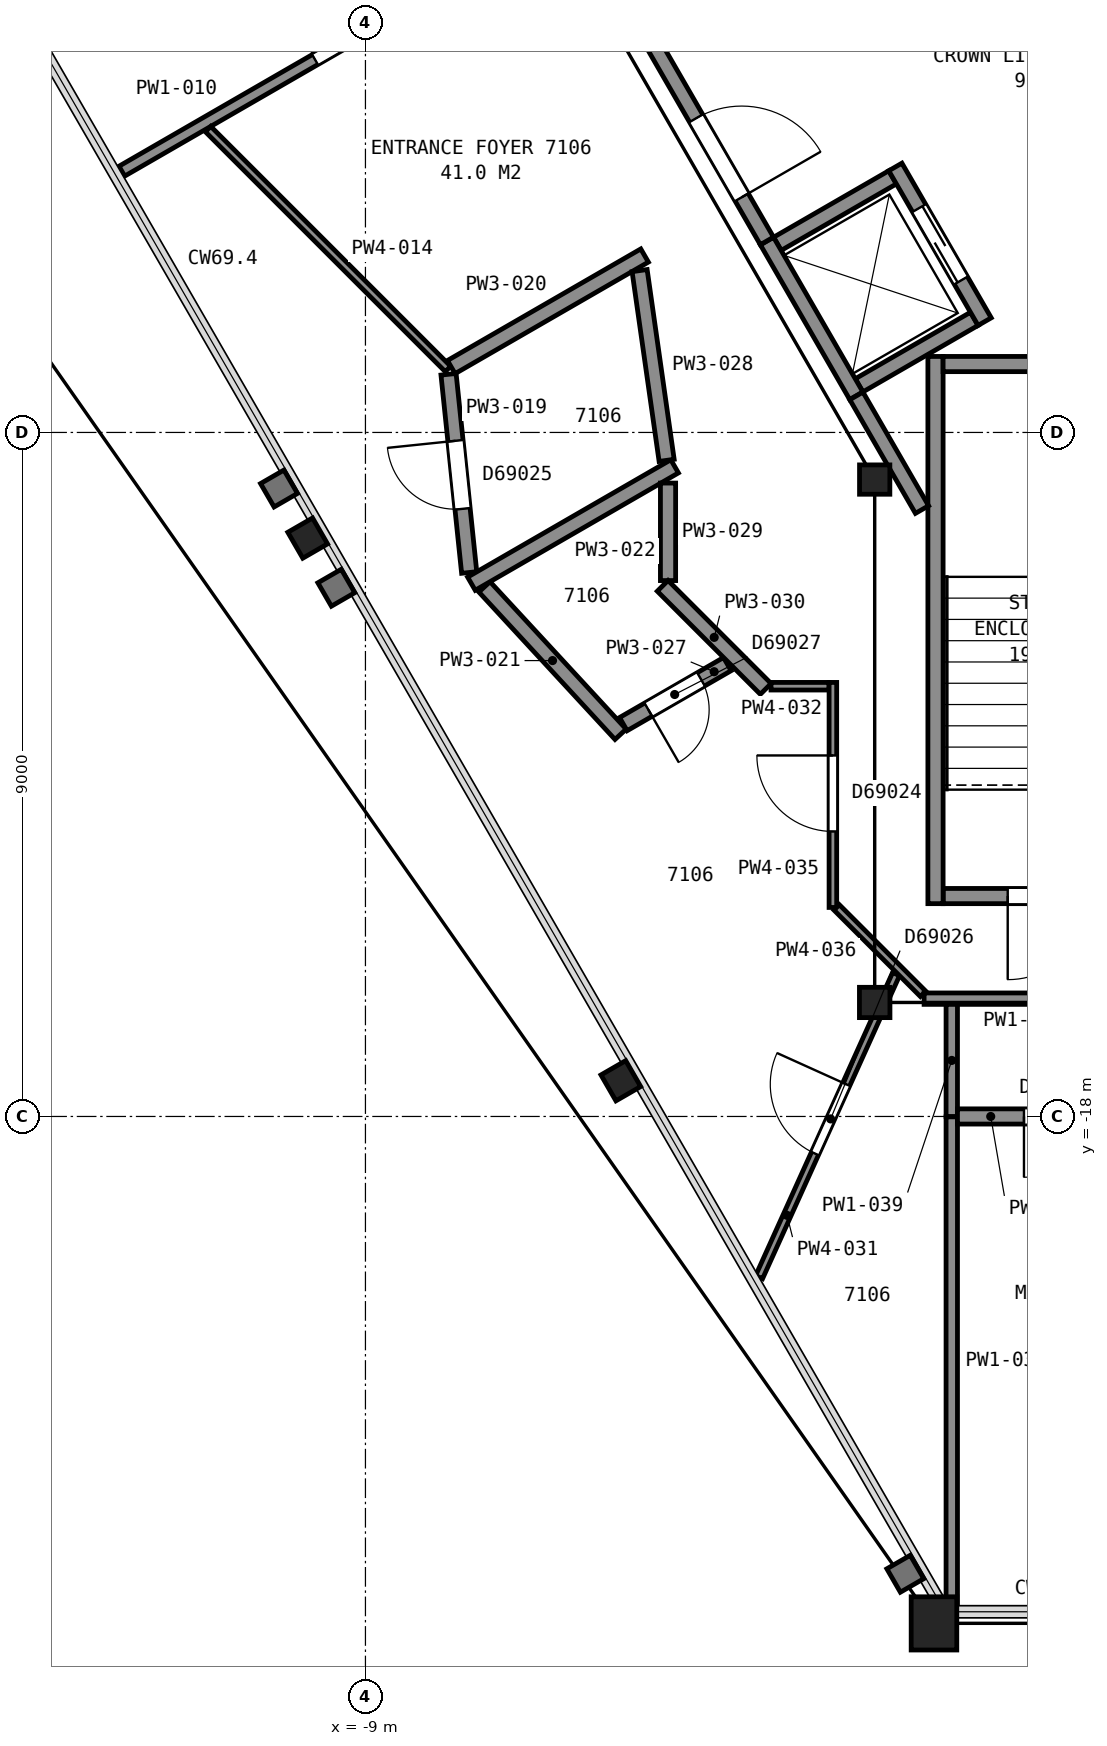
"""IFC4 building model, lengths in metres.
Left out: names, types, materials, properties, quantities, classifications, styles, units other than length and angle.
Written with IfcOpenShell. Run it as: python <this file> out.ifc"""

import sys

from ifc_helpers import new_model, si_unit, direction, frame, frame_2d, origin, origin_2d, place, context, subcontext, project, spatial, rectangle, hollow_rectangle, i_section, extrude, element, fill, save


model = new_model("IFC4")
c1 = context("Model", 3, precision=1e-05, world=origin(), true_north=direction((0.0, 1.0)))
c2 = subcontext(c1, "Body", "Model", "MODEL_VIEW")
j1 = project(units=[si_unit("LENGTHUNIT", "METRE"), si_unit("PLANEANGLEUNIT", "RADIAN")], contexts=[c1])
p1 = place(None, origin())
s1 = spatial("IfcSite", under=j1, at=p1, CompositionType="ELEMENT")
p2 = place(p1, origin())
s2 = spatial("IfcBuilding", under=s1, at=p2, CompositionType="ELEMENT")
p3 = place(p2, frame((0.0, 0.0, 282.5)))
s3 = spatial("IfcBuildingStorey", under=s2, at=p3, CompositionType="ELEMENT", Elevation=282.5)
for number, where, z_axis, x_axis in (
    (1, (-9.76, -10.39, 0.0), (0.0, 0.0, 1.0), (-0.5, 0.866, 0.0)),
    (2, (-5.64, -17.53, 0.0), (0.0, 0.0, 1.0), (-0.5, 0.866, 0.0)),
):
    element("IfcColumn", number, at=place(p3, frame(where, z_axis=z_axis, x_axis=x_axis)), inside=s3, PredefinedType="COLUMN", context=c2, shape_type="SweptSolid", body=[
        extrude(i_section(OverallWidth=0.394, OverallDepth=0.376, WebThickness=0.017, FlangeThickness=0.028, FilletRadius=0.015, at=origin_2d()), origin(), (0.0, 0.0, 1.0), 3.7),
    ])
p4 = place(p3, frame((-1.52, -24.67, 0.0), z_axis=(0.0, 0.0, 1.0), x_axis=(-1.0, 0.0, 0.0)))
e3 = element("IfcColumn", 3, at=p4, inside=s3, PredefinedType="COLUMN", context=c2, shape_type="SweptSolid", body=[
    extrude(hollow_rectangle(XDim=0.6, YDim=0.7, WallThickness=0.04, at=origin_2d()), origin(), (0.0, 0.0, 1.0), 3.7),
])
p5 = place(p3, frame((-2.3, -9.62, 0.0), z_axis=(0.0, 0.0, 1.0), x_axis=(1.0, 0.0, 0.0)))
e4 = element("IfcColumn", 4, at=p5, inside=s3, PredefinedType="COLUMN", context=c2, shape_type="SweptSolid", body=[
    extrude(i_section(OverallWidth=0.399, OverallDepth=0.386, WebThickness=0.021, FlangeThickness=0.033, FilletRadius=0.015, at=origin_2d()), origin(), (0.0, 0.0, 1.0), 3.7),
])
p6 = place(p3, frame((-2.3, -16.5, 0.0), z_axis=(0.0, 0.0, 1.0), x_axis=(-1.0, 0.0, 0.0)))
e5 = element("IfcColumn", 5, at=p6, inside=s3, PredefinedType="COLUMN", context=c2, shape_type="SweptSolid", body=[
    extrude(i_section(OverallWidth=0.401, OverallDepth=0.399, WebThickness=0.025, FlangeThickness=0.04, FilletRadius=0.015, at=origin_2d()), origin(), (0.0, 0.0, 1.0), 3.7),
])
p7 = place(p3, frame((-1.4, -15.1, 0.0), z_axis=(0.0, 0.0, 1.0), x_axis=(1.0, 0.0, 0.0)))
e6 = element("IfcWall", 6, at=p7, inside=s3, PredefinedType="PARTITIONING", context=c2, shape_type="SweptSolid", body=[
    extrude(rectangle(XDim=2.8, YDim=0.2, at=frame_2d((1.4, 0.0))), origin(), (0.0, 0.0, 1.0), 3.45),
])
p8 = place(p7, frame((0.85, 0.0, 0.0)))
e7 = element("IfcOpeningElement", 7, at=p8, cuts=e6, PredefinedType="OPENING", context=c2, shape_type="SweptSolid", body=[
    extrude(rectangle(XDim=1.1, YDim=2.1, at=frame_2d((0.55, 1.05))), frame((0.0, 0.11, 0.0), z_axis=(0.0, -1.0, 0.0), x_axis=(1.0, 0.0, 0.0)), (0.0, 0.0, 1.0), 0.22),
])
p9 = place(p3, frame((-1.5, -8.0, 0.0), z_axis=(0.0, 0.0, 1.0), x_axis=(0.0, -1.0, 0.0)))
e8 = element("IfcWall", 8, at=p9, inside=s3, PredefinedType="PARTITIONING", context=c2, shape_type="SweptSolid", body=[
    extrude(rectangle(XDim=7.2, YDim=0.2, at=frame_2d((3.6, 0.0))), origin(), (0.0, 0.0, 1.0), 3.45),
])
p10 = place(p3, frame((-1.4, -8.1, 0.0), z_axis=(0.0, 0.0, 1.0), x_axis=(1.0, 0.0, 0.0)))
e9 = element("IfcWall", 9, at=p10, inside=s3, PredefinedType="PARTITIONING", context=c2, shape_type="SweptSolid", body=[
    extrude(rectangle(XDim=2.8, YDim=0.2, at=frame_2d((1.4, 0.0))), origin(), (0.0, 0.0, 1.0), 3.45),
])
for number, where, z_axis, x_axis in (
    (10, (-2.505, -8.38, 0.0), (0.0, 0.0, 1.0), (0.866, 0.5, 0.0)),
    (11, (-3.58, -6.519, 0.0), (0.0, 0.0, 1.0), (0.866, 0.5, 0.0)),
):
    element("IfcWall", number, at=place(p3, frame(where, z_axis=z_axis, x_axis=x_axis)), inside=s3, PredefinedType="PARTITIONING", context=c2, shape_type="SweptSolid", body=[
        extrude(rectangle(XDim=1.75, YDim=0.2, at=frame_2d((0.875, 0.0))), origin(), (0.0, 0.0, 1.0), 3.7),
    ])
p11 = place(p3, frame((-0.853, -7.542, 0.0), z_axis=(0.0, 0.0, 1.0), x_axis=(-0.500016218704, 0.866016039709, 0.0)))
e12 = element("IfcWall", 12, at=p11, inside=s3, PredefinedType="PARTITIONING", context=c2, shape_type="SweptSolid", body=[
    extrude(rectangle(XDim=2.35, YDim=0.2, at=frame_2d((1.175, 0.0))), origin(), (0.0, 0.0, 1.0), 3.7),
])
p12 = place(p11, frame((0.625, 0.0, 0.0)))
e13 = element("IfcOpeningElement", 13, at=p12, cuts=e12, PredefinedType="OPENING", context=c2, shape_type="SweptSolid", body=[
    extrude(rectangle(XDim=1.1, YDim=2.1, at=frame_2d((0.55, 1.05))), frame((0.0, 0.11, 0.0), z_axis=(0.0, -1.0, 0.0), x_axis=(1.0, 0.0, 0.0)), (0.0, 0.0, 1.0), 0.22),
])
p13 = place(p3, frame((-2.542, -8.517, 0.0), z_axis=(0.0, 0.0, 1.0), x_axis=(-0.500016218704, 0.866016039709, 0.0)))
e14 = element("IfcWall", 14, at=p13, inside=s3, PredefinedType="PARTITIONING", context=c2, shape_type="SweptSolid", body=[
    extrude(rectangle(XDim=2.35, YDim=0.2, at=frame_2d((1.175, 0.0))), origin(), (0.0, 0.0, 1.0), 3.7),
])
p14 = place(p3, frame((-7.141, -0.551, 0.0), z_axis=(0.0, 0.0, 1.0), x_axis=(0.500001302854, -0.86602465158, 0.0)))
e15 = element("IfcWall", 15, at=p14, inside=s3, PredefinedType="PARTITIONING", context=c2, shape_type="SweptSolid", body=[
    extrude(rectangle(XDim=6.846, YDim=0.2, at=frame_2d((3.423, 0.0))), origin(), (0.0, 0.0, 1.0), 3.45),
])
p15 = place(p14, frame((4.983, 0.0, 0.0)))
e16 = element("IfcOpeningElement", 16, at=p15, cuts=e15, PredefinedType="OPENING", context=c2, shape_type="SweptSolid", body=[
    extrude(rectangle(XDim=1.2, YDim=2.1, at=frame_2d((0.6, 1.05))), frame((0.0, 0.11, 0.0), z_axis=(0.0, -1.0, 0.0), x_axis=(1.0, 0.0, 0.0)), (0.0, 0.0, 1.0), 0.22),
])
p16 = place(p3, frame((-2.541, -8.519, 0.0), z_axis=(0.0, 0.0, 1.0), x_axis=(0.500016142392, -0.86601608377, 0.0)))
e17 = element("IfcWall", 17, at=p16, inside=s3, PredefinedType="PARTITIONING", context=c2, shape_type="SweptSolid", body=[
    extrude(rectangle(XDim=1.727, YDim=0.2, at=frame_2d((0.864, 0.0))), origin(), (0.0, 0.0, 1.0), 3.45),
])
p17 = place(p3, frame((-12.205, -5.562, 0.0), z_axis=(0.0, 0.0, 1.0), x_axis=(0.866006351856, 0.500032997455, 0.0)))
e18 = element("IfcWall", 18, at=p17, inside=s3, PredefinedType="PARTITIONING", context=c2, shape_type="SweptSolid", body=[
    extrude(rectangle(XDim=5.671, YDim=0.15, at=frame_2d((2.835, 0.0))), origin(), (0.0, 0.0, 1.0), 2.723),
])
p18 = place(p17, frame((2.935, 0.0, 0.0)))
e19 = element("IfcOpeningElement", 19, at=p18, cuts=e18, PredefinedType="OPENING", context=c2, shape_type="SweptSolid", body=[
    extrude(rectangle(XDim=1.0, YDim=2.1, at=frame_2d((0.5, 1.05))), frame((0.0, 0.085, 0.0), z_axis=(0.0, -1.0, 0.0), x_axis=(1.0, 0.0, 0.0)), (0.0, 0.0, 1.0), 0.17),
])
p19 = place(p3, frame((-11.071, -5.008, 0.0), z_axis=(0.0, 0.0, 1.0), x_axis=(0.707079435951, -0.707134125365, 0.0)))
e20 = element("IfcWall", 20, at=p19, inside=s3, PredefinedType="PARTITIONING", context=c2, shape_type="SweptSolid", body=[
    extrude(rectangle(XDim=4.464, YDim=0.1, at=frame_2d((2.232, 0.0))), origin(), (0.0, 0.0, 1.0), 2.723),
])
p20 = place(p3, frame((-7.907, -8.235, 0.0), z_axis=(0.0, 0.0, 1.0), x_axis=(0.103623353624, -0.994616609847, 0.0)))
e21 = element("IfcWall", 21, at=p20, inside=s3, PredefinedType="PARTITIONING", context=c2, shape_type="SweptSolid", body=[
    extrude(rectangle(XDim=2.622, YDim=0.2, at=frame_2d((1.311, 0.0))), origin(), (0.0, 0.0, 1.0), 2.723),
])
p21 = place(p20, frame((0.88, 0.0, 0.0)))
e22 = element("IfcOpeningElement", 22, at=p21, cuts=e21, PredefinedType="OPENING", context=c2, shape_type="SweptSolid", body=[
    extrude(rectangle(XDim=0.9, YDim=2.1, at=frame_2d((0.45, 1.05))), frame((0.0, 0.11, 0.0), z_axis=(0.0, -1.0, 0.0), x_axis=(1.0, 0.0, 0.0)), (0.0, 0.0, 1.0), 0.22),
])
p22 = place(p3, frame((-7.871, -8.14, 0.0), z_axis=(0.0, 0.0, 1.0), x_axis=(0.866106676517, 0.49985920507, 0.0)))
e23 = element("IfcWall", 23, at=p22, inside=s3, PredefinedType="PARTITIONING", context=c2, shape_type="SweptSolid", body=[
    extrude(rectangle(XDim=2.936, YDim=0.2, at=frame_2d((1.468, 0.0))), origin(), (0.0, 0.0, 1.0), 2.723),
])
p23 = place(p3, frame((-7.434, -11.032, 0.0), z_axis=(0.0, 0.0, 1.0), x_axis=(0.678387636859, -0.734704167782, 0.0)))
e24 = element("IfcWall", 24, at=p23, inside=s3, PredefinedType="PARTITIONING", context=c2, shape_type="SweptSolid", body=[
    extrude(rectangle(XDim=2.64, YDim=0.2, at=frame_2d((1.32, 0.0))), origin(), (0.0, 0.0, 1.0), 2.723),
])
p24 = place(p3, frame((-7.606, -10.99, 0.0), z_axis=(0.0, 0.0, 1.0), x_axis=(0.865956409518, 0.500119482538, 0.0)))
e25 = element("IfcWall", 25, at=p24, inside=s3, PredefinedType="PARTITIONING", context=c2, shape_type="SweptSolid", body=[
    extrude(rectangle(XDim=3.087, YDim=0.2, at=frame_2d((1.543, 0.0))), origin(), (0.0, 0.0, 1.0), 2.723),
])
p25 = place(p3, frame((-5.607, -12.838, 0.0), z_axis=(0.0, 0.0, 1.0), x_axis=(0.866095534226, 0.499878510834, 0.0)))
e26 = element("IfcWall", 26, at=p25, inside=s3, PredefinedType="PARTITIONING", context=c2, shape_type="SweptSolid", body=[
    extrude(rectangle(XDim=1.58, YDim=0.2, at=frame_2d((0.79, 0.0))), origin(), (0.0, 0.0, 1.0), 2.723),
])
p26 = place(p25, frame((0.38, 0.0, 0.0)))
e27 = element("IfcOpeningElement", 27, at=p26, cuts=e26, PredefinedType="OPENING", context=c2, shape_type="SweptSolid", body=[
    extrude(rectangle(XDim=0.8, YDim=2.1, at=frame_2d((0.4, 1.05))), frame((0.0, 0.11, 0.0), z_axis=(0.0, -1.0, 0.0), x_axis=(1.0, 0.0, 0.0)), (0.0, 0.0, 1.0), 0.22),
])
p27 = place(p3, frame((-5.393, -6.871, 0.0), z_axis=(0.0, 0.0, 1.0), x_axis=(0.140960508483, -0.990015219604, 0.0)))
e28 = element("IfcWall", 28, at=p27, inside=s3, PredefinedType="PARTITIONING", context=c2, shape_type="SweptSolid", body=[
    extrude(rectangle(XDim=2.522, YDim=0.2, at=frame_2d((1.261, 0.0))), origin(), (0.0, 0.0, 1.0), 2.723),
])
p28 = place(p3, frame((-5.019, -10.949, 0.0), z_axis=(0.0, 0.0, 1.0), x_axis=(0.0, 1.0, 0.0)))
e29 = element("IfcWall", 29, at=p28, inside=s3, PredefinedType="PARTITIONING", context=c2, shape_type="SweptSolid", body=[
    extrude(rectangle(XDim=1.283, YDim=0.2, at=frame_2d((0.642, 0.0))), origin(), (0.0, 0.0, 1.0), 2.723),
])
p29 = place(p3, frame((-5.09, -11.018, 0.0), z_axis=(0.0, 0.0, 1.0), x_axis=(0.707106781187, -0.707106781187, 0.0)))
e30 = element("IfcWall", 30, at=p29, inside=s3, PredefinedType="PARTITIONING", context=c2, shape_type="SweptSolid", body=[
    extrude(rectangle(XDim=1.918, YDim=0.2, at=frame_2d((0.959, 0.0))), origin(), (0.0, 0.0, 1.0), 2.723),
])
p30 = place(p3, frame((-2.019, -16.127, 0.0), z_axis=(0.0, 0.0, 1.0), x_axis=(-0.411876718461, -0.911239578151, 0.0)))
e31 = element("IfcWall", 31, at=p30, inside=s3, PredefinedType="PARTITIONING", context=c2, shape_type="SweptSolid", body=[
    extrude(rectangle(XDim=4.376, YDim=0.1, at=frame_2d((2.188, 0.0))), origin(), (0.0, 0.0, 1.0), 2.723),
])
p31 = place(p30, frame((1.591, 0.0, 0.0)))
e32 = element("IfcOpeningElement", 32, at=p31, cuts=e31, PredefinedType="OPENING", context=c2, shape_type="SweptSolid", body=[
    extrude(rectangle(XDim=1.0, YDim=2.1, at=frame_2d((0.5, 1.05))), frame((0.0, 0.06, 0.0), z_axis=(0.0, -1.0, 0.0), x_axis=(1.0, 0.0, 0.0)), (0.0, 0.0, 1.0), 0.12),
])
p32 = place(p3, frame((-3.664, -12.339, 0.0), z_axis=(0.0, 0.0, 1.0), x_axis=(1.0, 0.0, 0.0)))
e33 = element("IfcWall", 33, at=p32, inside=s3, PredefinedType="PARTITIONING", context=c2, shape_type="SweptSolid", body=[
    extrude(rectangle(XDim=0.764, YDim=0.1, at=frame_2d((0.382, 0.0))), origin(), (0.0, 0.0, 1.0), 2.723),
])
p33 = place(p3, frame((-2.85, -15.25, 0.0), z_axis=(0.0, 0.0, 1.0), x_axis=(0.0, 1.0, 0.0)))
e34 = element("IfcWall", 34, at=p33, inside=s3, PredefinedType="PARTITIONING", context=c2, shape_type="SweptSolid", body=[
    extrude(rectangle(XDim=2.961, YDim=0.1, at=frame_2d((1.48, 0.0))), origin(), (0.0, 0.0, 1.0), 2.723),
])
p34 = place(p33, frame((1.0, 0.0, 0.0)))
e35 = element("IfcOpeningElement", 35, at=p34, cuts=e34, PredefinedType="OPENING", context=c2, shape_type="SweptSolid", body=[
    extrude(rectangle(XDim=1.0, YDim=2.1, at=frame_2d((0.5, 1.05))), frame((0.0, 0.06, 0.0), z_axis=(0.0, -1.0, 0.0), x_axis=(1.0, 0.0, 0.0)), (0.0, 0.0, 1.0), 0.12),
])
p35 = place(p3, frame((-2.801, -15.25, 0.0), z_axis=(0.0, 0.0, 1.0), x_axis=(0.707106781187, -0.707106781187, 0.0)))
e36 = element("IfcWall", 36, at=p35, inside=s3, PredefinedType="PARTITIONING", context=c2, shape_type="SweptSolid", body=[
    extrude(rectangle(XDim=1.608, YDim=0.1, at=frame_2d((0.804, 0.0))), origin(), (0.0, 0.0, 1.0), 2.723),
])
p36 = place(p3, frame((-1.65, -16.45, 0.0), z_axis=(0.0, 0.0, 1.0), x_axis=(1.0, 0.0, 0.0)))
e37 = element("IfcWall", 37, at=p36, inside=s3, PredefinedType="PARTITIONING", context=c2, shape_type="SweptSolid", body=[
    extrude(rectangle(XDim=2.625, YDim=0.15, at=frame_2d((1.312, 0.0))), origin(), (0.0, 0.0, 1.0), 2.723),
])
p37 = place(p3, frame((-1.286, -24.421, 0.0), z_axis=(0.0, 0.0, 1.0), x_axis=(0.0, 1.0, 0.0)))
e38 = element("IfcWall", 38, at=p37, inside=s3, PredefinedType="PARTITIONING", context=c2, shape_type="SweptSolid", body=[
    extrude(rectangle(XDim=6.416, YDim=0.15, at=frame_2d((3.208, 0.0))), origin(), (0.0, 0.0, 1.0), 2.723),
])
p38 = place(p3, frame((-1.286, -18.0, 0.0), z_axis=(0.0, 0.0, 1.0), x_axis=(0.0, 1.0, 0.0)))
e39 = element("IfcWall", 39, at=p38, inside=s3, PredefinedType="PARTITIONING", context=c2, shape_type="SweptSolid", body=[
    extrude(rectangle(XDim=1.475, YDim=0.15, at=frame_2d((0.738, 0.0))), origin(), (0.0, 0.0, 1.0), 2.723),
])
p39 = place(p3, frame((-1.211, -18.0, 0.0), z_axis=(0.0, 0.0, 1.0), x_axis=(1.0, 0.0, 0.0)))
e40 = element("IfcWall", 40, at=p39, inside=s3, PredefinedType="PARTITIONING", context=c2, shape_type="SweptSolid", body=[
    extrude(rectangle(XDim=2.511, YDim=0.2, at=frame_2d((1.255, 0.0))), origin(), (0.0, 0.0, 1.0), 2.723),
])
p40 = place(p39, frame((0.875, 0.0, 0.0)))
e41 = element("IfcOpeningElement", 41, at=p40, cuts=e40, PredefinedType="OPENING", context=c2, shape_type="SweptSolid", body=[
    extrude(rectangle(XDim=0.8, YDim=2.1, at=frame_2d((0.4, 1.05))), frame((0.0, 0.11, 0.0), z_axis=(0.0, -1.0, 0.0), x_axis=(1.0, 0.0, 0.0)), (0.0, 0.0, 1.0), 0.22),
])
p41 = place(p8, origin())
e42 = element("IfcDoor", 42, at=p41, inside=s3, OperationType="SINGLE_SWING_LEFT", PredefinedType="DOOR", context=c2, shape_type="SweptSolid", body=[
    extrude(rectangle(XDim=1.1, YDim=2.1, at=frame_2d((0.55, 1.05))), frame((0.0, 0.025, 0.0), z_axis=(0.0, -1.0, 0.0), x_axis=(1.0, 0.0, 0.0)), (0.0, 0.0, 1.0), 0.05),
])
fill(e7, e42)
p42 = place(p12, origin())
e43 = element("IfcDoor", 43, at=p42, inside=s3, OperationType="SLIDING_TO_LEFT", PredefinedType="DOOR", context=c2, shape_type="SweptSolid", body=[
    extrude(rectangle(XDim=1.1, YDim=2.1, at=frame_2d((0.55, 1.05))), frame((0.0, 0.025, 0.0), z_axis=(0.0, -1.0, 0.0), x_axis=(1.0, 0.0, 0.0)), (0.0, 0.0, 1.0), 0.05),
])
fill(e13, e43)
p43 = place(p15, origin())
e44 = element("IfcDoor", 44, at=p43, inside=s3, OperationType="SINGLE_SWING_RIGHT", PredefinedType="DOOR", context=c2, shape_type="SweptSolid", body=[
    extrude(rectangle(XDim=1.2, YDim=2.1, at=frame_2d((0.6, 1.05))), frame((0.0, 0.025, 0.0), z_axis=(0.0, -1.0, 0.0), x_axis=(1.0, 0.0, 0.0)), (0.0, 0.0, 1.0), 0.05),
])
fill(e16, e44)
p44 = place(p18, origin())
e45 = element("IfcDoor", 45, at=p44, inside=s3, OperationType="SINGLE_SWING_RIGHT", PredefinedType="DOOR", context=c2, shape_type="SweptSolid", body=[
    extrude(rectangle(XDim=1.0, YDim=2.1, at=frame_2d((0.5, 1.05))), frame((0.0, 0.025, 0.0), z_axis=(0.0, -1.0, 0.0), x_axis=(1.0, 0.0, 0.0)), (0.0, 0.0, 1.0), 0.05),
])
fill(e19, e45)
p45 = place(p21, origin())
e46 = element("IfcDoor", 46, at=p45, inside=s3, OperationType="SINGLE_SWING_LEFT", PredefinedType="DOOR", context=c2, shape_type="SweptSolid", body=[
    extrude(rectangle(XDim=0.9, YDim=2.1, at=frame_2d((0.45, 1.05))), frame((0.0, 0.025, 0.0), z_axis=(0.0, -1.0, 0.0), x_axis=(1.0, 0.0, 0.0)), (0.0, 0.0, 1.0), 0.05),
])
fill(e22, e46)
p46 = place(p26, origin())
e47 = element("IfcDoor", 47, at=p46, inside=s3, OperationType="SINGLE_SWING_LEFT", PredefinedType="DOOR", context=c2, shape_type="SweptSolid", body=[
    extrude(rectangle(XDim=0.8, YDim=2.1, at=frame_2d((0.4, 1.05))), frame((0.0, 0.025, 0.0), z_axis=(0.0, -1.0, 0.0), x_axis=(1.0, 0.0, 0.0)), (0.0, 0.0, 1.0), 0.05),
])
fill(e27, e47)
p47 = place(p31, origin())
e48 = element("IfcDoor", 48, at=p47, inside=s3, OperationType="SINGLE_SWING_LEFT", PredefinedType="DOOR", context=c2, shape_type="SweptSolid", body=[
    extrude(rectangle(XDim=1.0, YDim=2.1, at=frame_2d((0.5, 1.05))), frame((0.0, 0.025, 0.0), z_axis=(0.0, -1.0, 0.0), x_axis=(1.0, 0.0, 0.0)), (0.0, 0.0, 1.0), 0.05),
])
fill(e32, e48)
p48 = place(p34, origin())
e49 = element("IfcDoor", 49, at=p48, inside=s3, OperationType="SINGLE_SWING_RIGHT", PredefinedType="DOOR", context=c2, shape_type="SweptSolid", body=[
    extrude(rectangle(XDim=1.0, YDim=2.1, at=frame_2d((0.5, 1.05))), frame((0.0, 0.025, 0.0), z_axis=(0.0, -1.0, 0.0), x_axis=(1.0, 0.0, 0.0)), (0.0, 0.0, 1.0), 0.05),
])
fill(e35, e49)
p49 = place(p40, origin())
e50 = element("IfcDoor", 50, at=p49, inside=s3, OperationType="SINGLE_SWING_LEFT", PredefinedType="DOOR", context=c2, shape_type="SweptSolid", body=[
    extrude(rectangle(XDim=0.8, YDim=2.1, at=frame_2d((0.4, 1.05))), frame((0.0, 0.025, 0.0), z_axis=(0.0, -1.0, 0.0), x_axis=(1.0, 0.0, 0.0)), (0.0, 0.0, 1.0), 0.05),
])
fill(e41, e50)
save(model, sys.argv[1])
